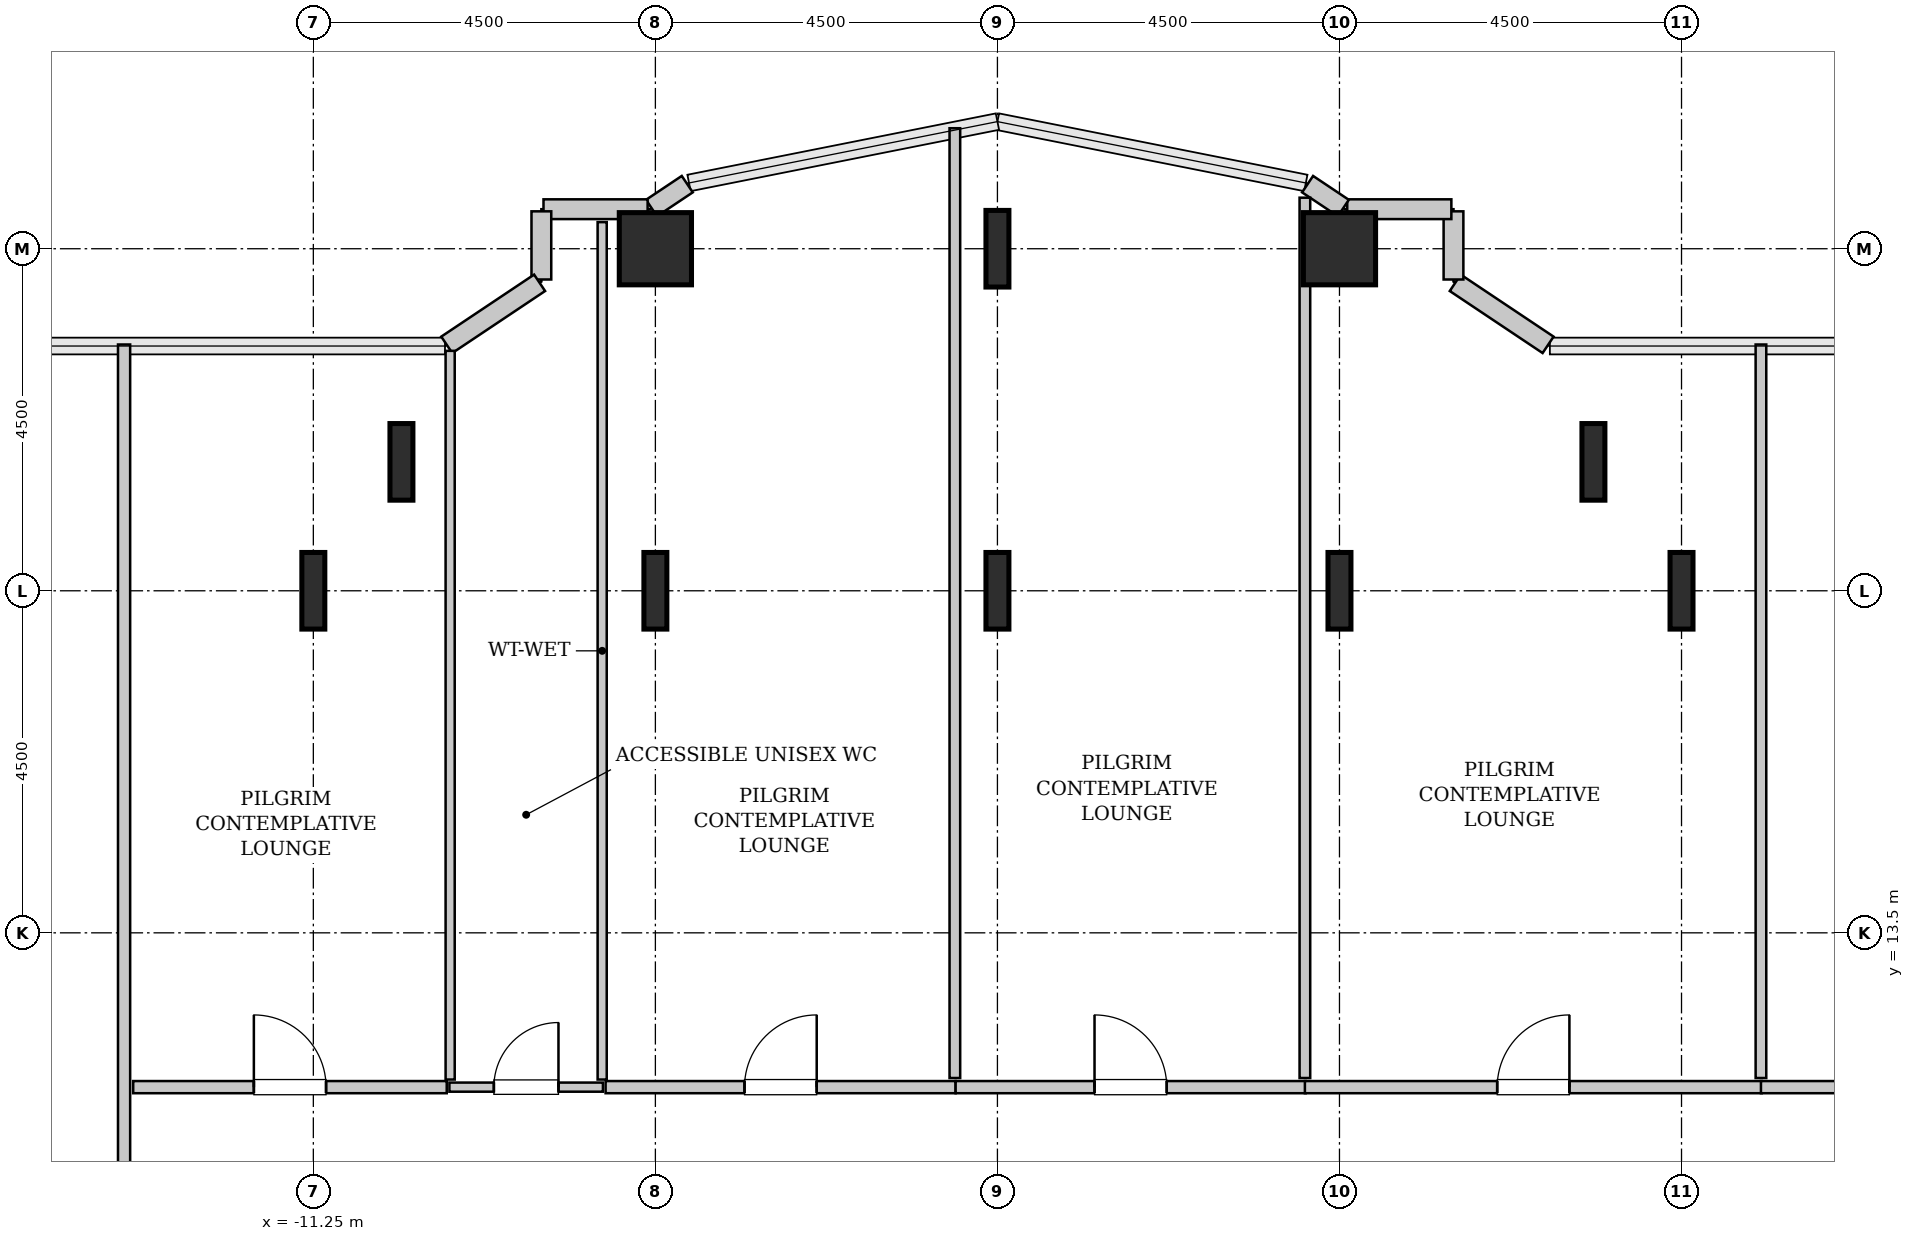
"""IFC4 building model, lengths in metres.
Left out: names, types, materials, properties, quantities, classifications, styles, units other than length and angle.
Written with IfcOpenShell. Run it as: python <this file> out.ifc"""

import sys

from ifc_helpers import new_model, si_unit, direction, frame, frame_2d, origin, origin_2d, place, context, subcontext, project, spatial, rectangle, hollow_rectangle, i_section, extrude, source, transform, mapped, element, fill, save


model = new_model("IFC4")
c1 = context("Model", 3, precision=1e-05, world=origin(), true_north=direction((0.0, 1.0)))
c2 = subcontext(c1, "Body", "Model", "MODEL_VIEW")
j1 = project(units=[si_unit("LENGTHUNIT", "METRE"), si_unit("PLANEANGLEUNIT", "RADIAN")], contexts=[c1])
p1 = place(None, origin())
s1 = spatial("IfcSite", under=j1, at=p1, CompositionType="ELEMENT")
p2 = place(p1, origin())
s2 = spatial("IfcBuilding", under=s1, at=p2, CompositionType="ELEMENT")
p3 = place(p2, frame((0.0, 0.0, 59.6)))
s3 = spatial("IfcBuildingStorey", under=s2, at=p3, CompositionType="ELEMENT", Elevation=59.6)
m1 = source(origin(), c2, "Body", "SweptSolid", [
    extrude(i_section(OverallWidth=0.302, OverallDepth=1.008, WebThickness=0.021, FlangeThickness=0.04, FilletRadius=0.03, at=origin_2d()), origin(), (0.0, 0.0, 1.0), 3.8),
])
for number, where, z_axis, x_axis in (
    (1, (-11.25, 18.0, 0.0), (0.0, 0.0, 1.0), (1.0, 0.0, 0.0)),
    (2, (-10.091, 19.696, 0.0), (0.0, 0.0, 1.0), (1.0, 0.0, 0.0)),
    (3, (-6.75, 18.0, 0.0), (0.0, 0.0, 1.0), (1.0, 0.0, 0.0)),
):
    element("IfcColumn", number, at=place(p3, frame(where, z_axis=z_axis, x_axis=x_axis)), inside=s3, PredefinedType="COLUMN", context=c2, shape_type="MappedRepresentation", body=[
        mapped(m1, transform((0.0, 0.0, 0.0), x_axis=(1.0, 0.0, 0.0), y_axis=(0.0, 1.0, 0.0), z_axis=(0.0, 0.0, 1.0), scale=1.0)),
    ])
m2 = source(origin(), c2, "Body", "SweptSolid", [
    extrude(hollow_rectangle(XDim=0.95, YDim=0.95, WallThickness=0.045, InnerFilletRadius=0.045, OuterFilletRadius=0.09, at=origin_2d()), origin(), (0.0, 0.0, 1.0), 3.8),
])
p4 = place(p3, frame((-6.75, 22.5, 0.0), z_axis=(0.0, 0.0, 1.0), x_axis=(1.0, 0.0, 0.0)))
e4 = element("IfcColumn", 4, at=p4, inside=s3, PredefinedType="COLUMN", context=c2, shape_type="MappedRepresentation", body=[
    mapped(m2, transform((0.0, 0.0, 0.0), x_axis=(1.0, 0.0, 0.0), y_axis=(0.0, 1.0, 0.0), z_axis=(0.0, 0.0, 1.0), scale=1.0)),
])
for number, where, z_axis, x_axis in (
    (5, (-2.25, 18.0, 0.0), (0.0, 0.0, 1.0), (1.0, 0.0, 0.0)),
    (6, (-2.25, 22.5, 0.0), (0.0, 0.0, 1.0), (1.0, 0.0, 0.0)),
    (7, (2.25, 18.0, 0.0), (0.0, 0.0, 1.0), (1.0, 0.0, 0.0)),
):
    element("IfcColumn", number, at=place(p3, frame(where, z_axis=z_axis, x_axis=x_axis)), inside=s3, PredefinedType="COLUMN", context=c2, shape_type="MappedRepresentation", body=[
        mapped(m1, transform((0.0, 0.0, 0.0), x_axis=(1.0, 0.0, 0.0), y_axis=(0.0, 1.0, 0.0), z_axis=(0.0, 0.0, 1.0), scale=1.0)),
    ])
p5 = place(p3, frame((2.25, 22.5, 0.0), z_axis=(0.0, 0.0, 1.0), x_axis=(1.0, 0.0, 0.0)))
e8 = element("IfcColumn", 8, at=p5, inside=s3, PredefinedType="COLUMN", context=c2, shape_type="MappedRepresentation", body=[
    mapped(m2, transform((0.0, 0.0, 0.0), x_axis=(1.0, 0.0, 0.0), y_axis=(0.0, 1.0, 0.0), z_axis=(0.0, 0.0, 1.0), scale=1.0)),
])
for number, where, z_axis, x_axis in (
    (9, (5.591, 19.696, 0.0), (0.0, 0.0, 1.0), (1.0, 0.0, 0.0)),
    (10, (6.75, 18.0, 0.0), (0.0, 0.0, 1.0), (1.0, 0.0, 0.0)),
):
    element("IfcColumn", number, at=place(p3, frame(where, z_axis=z_axis, x_axis=x_axis)), inside=s3, PredefinedType="COLUMN", context=c2, shape_type="MappedRepresentation", body=[
        mapped(m1, transform((0.0, 0.0, 0.0), x_axis=(1.0, 0.0, 0.0), y_axis=(0.0, 1.0, 0.0), z_axis=(0.0, 0.0, 1.0), scale=1.0)),
    ])
m3 = source(origin(), c2, "Body", "SweptSolid", [
    extrude(rectangle(XDim=1.469, YDim=0.26, at=frame_2d((0.734, 0.0))), origin(), (0.0, 0.0, 1.0), 3.55),
])
p6 = place(p3, frame((4.995, 21.236, 0.0), z_axis=(0.0, 0.0, 1.0), x_axis=(-0.831461760506, 0.555581983884, 0.0)))
e11 = element("IfcWall", 11, at=p6, inside=s3, PredefinedType="SOLIDWALL", context=c2, shape_type="MappedRepresentation", body=[
    mapped(m3, transform((0.0, 0.0, 0.0), x_axis=(1.0, 0.0, 0.0), y_axis=(0.0, 1.0, 0.0), z_axis=(0.0, 0.0, 1.0), scale=1.0)),
])
m4 = source(origin(), c2, "Body", "SweptSolid", [
    extrude(rectangle(XDim=0.897, YDim=0.26, at=frame_2d((0.448, 0.0))), origin(), (0.0, 0.0, 1.0), 3.55),
])
p7 = place(p3, frame((3.75, 22.095, 0.0), z_axis=(0.0, 0.0, 1.0), x_axis=(0.0, 1.0, 0.0)))
e12 = element("IfcWall", 12, at=p7, inside=s3, PredefinedType="SOLIDWALL", context=c2, shape_type="MappedRepresentation", body=[
    mapped(m4, transform((0.0, 0.0, 0.0), x_axis=(1.0, 0.0, 0.0), y_axis=(0.0, 1.0, 0.0), z_axis=(0.0, 0.0, 1.0), scale=1.0)),
])
m5 = source(origin(), c2, "Body", "SweptSolid", [
    extrude(rectangle(XDim=1.37, YDim=0.26, at=frame_2d((0.685, 0.0))), origin(), (0.0, 0.0, 1.0), 3.55),
])
p8 = place(p3, frame((3.722, 23.02, 0.0), z_axis=(0.0, 0.0, 1.0), x_axis=(-1.0, 0.0, 0.0)))
e13 = element("IfcWall", 13, at=p8, inside=s3, PredefinedType="SOLIDWALL", context=c2, shape_type="MappedRepresentation", body=[
    mapped(m5, transform((0.0, 0.0, 0.0), x_axis=(1.0, 0.0, 0.0), y_axis=(0.0, 1.0, 0.0), z_axis=(0.0, 0.0, 1.0), scale=1.0)),
])
m6 = source(origin(), c2, "Body", "SweptSolid", [
    extrude(rectangle(XDim=0.565, YDim=0.26, at=frame_2d((0.283, 0.0))), origin(), (0.0, 0.0, 1.0), 3.55),
])
for number, where, z_axis, x_axis in (
    (14, (2.301, 23.036, 0.0), (0.0, 0.0, 1.0), (-0.832, 0.555, 0.0)),
    (15, (-6.331, 23.35, 0.0), (0.0, 0.0, 1.0), (-0.832, -0.555, 0.0)),
):
    element("IfcWall", number, at=place(p3, frame(where, z_axis=z_axis, x_axis=x_axis)), inside=s3, PredefinedType="SOLIDWALL", context=c2, shape_type="MappedRepresentation", body=[
        mapped(m6, transform((0.0, 0.0, 0.0), x_axis=(1.0, 0.0, 0.0), y_axis=(0.0, 1.0, 0.0), z_axis=(0.0, 0.0, 1.0), scale=1.0)),
    ])
p9 = place(p3, frame((-6.852, 23.02, 0.0), z_axis=(0.0, 0.0, 1.0), x_axis=(-1.0, 0.0, 0.0)))
e16 = element("IfcWall", 16, at=p9, inside=s3, PredefinedType="SOLIDWALL", context=c2, shape_type="MappedRepresentation", body=[
    mapped(m5, transform((0.0, 0.0, 0.0), x_axis=(1.0, 0.0, 0.0), y_axis=(0.0, 1.0, 0.0), z_axis=(0.0, 0.0, 1.0), scale=1.0)),
])
p10 = place(p3, frame((-8.25, 22.992, 0.0), z_axis=(0.0, 0.0, 1.0), x_axis=(0.0, -1.0, 0.0)))
e17 = element("IfcWall", 17, at=p10, inside=s3, PredefinedType="SOLIDWALL", context=c2, shape_type="MappedRepresentation", body=[
    mapped(m4, transform((0.0, 0.0, 0.0), x_axis=(1.0, 0.0, 0.0), y_axis=(0.0, 1.0, 0.0), z_axis=(0.0, 0.0, 1.0), scale=1.0)),
])
p11 = place(p3, frame((-8.273, 22.052, 0.0), z_axis=(0.0, 0.0, 1.0), x_axis=(-0.831461760506, -0.555581983884, 0.0)))
e18 = element("IfcWall", 18, at=p11, inside=s3, PredefinedType="SOLIDWALL", context=c2, shape_type="MappedRepresentation", body=[
    mapped(m3, transform((0.0, 0.0, 0.0), x_axis=(1.0, 0.0, 0.0), y_axis=(0.0, 1.0, 0.0), z_axis=(0.0, 0.0, 1.0), scale=1.0)),
])
m7 = source(origin(), c2, "Body", "SweptSolid", [
    extrude(rectangle(XDim=2.02, YDim=0.12, at=frame_2d((1.01, 0.0))), origin(), (0.0, 0.0, 1.0), 3.535),
])
p12 = place(p3, frame((-9.46, 11.47, 0.0), z_axis=(0.0, 0.0, 1.0), x_axis=(1.0, 0.0, 0.0)))
e19 = element("IfcWall", 19, at=p12, inside=s3, PredefinedType="PLUMBINGWALL", context=c2, shape_type="MappedRepresentation", body=[
    mapped(m7, transform((0.0, 0.0, 0.0), x_axis=(1.0, 0.0, 0.0), y_axis=(0.0, 1.0, 0.0), z_axis=(0.0, 0.0, 1.0), scale=1.0)),
])
p13 = place(p12, frame((0.585, 0.0, 0.0)))
e20 = element("IfcOpeningElement", 20, at=p13, cuts=e19, PredefinedType="OPENING", context=c2, shape_type="SweptSolid", body=[
    extrude(rectangle(XDim=0.85, YDim=2.1, at=frame_2d((0.425, 1.05))), frame((0.0, 0.07, 0.0), z_axis=(0.0, -1.0, 0.0), x_axis=(1.0, 0.0, 0.0)), (0.0, 0.0, 1.0), 0.14),
])
m8 = source(origin(), c2, "Body", "SweptSolid", [
    extrude(rectangle(XDim=11.28, YDim=0.12, at=frame_2d((5.64, 0.0))), origin(), (0.0, 0.0, 1.0), 3.535),
])
p14 = place(p3, frame((-7.45, 11.57, 0.0), z_axis=(0.0, 0.0, 1.0), x_axis=(0.0, 1.0, 0.0)))
e21 = element("IfcWall", 21, at=p14, inside=s3, PredefinedType="PLUMBINGWALL", context=c2, shape_type="MappedRepresentation", body=[
    mapped(m8, transform((0.0, 0.0, 0.0), x_axis=(1.0, 0.0, 0.0), y_axis=(0.0, 1.0, 0.0), z_axis=(0.0, 0.0, 1.0), scale=1.0)),
])
m9 = source(origin(), c2, "Body", "SweptSolid", [
    extrude(rectangle(XDim=9.587, YDim=0.12, at=frame_2d((4.793, 0.0))), origin(), (0.0, 0.0, 1.0), 3.535),
])
p15 = place(p3, frame((-9.45, 11.57, 0.0), z_axis=(0.0, 0.0, 1.0), x_axis=(0.0, 1.0, 0.0)))
e22 = element("IfcWall", 22, at=p15, inside=s3, PredefinedType="PLUMBINGWALL", context=c2, shape_type="MappedRepresentation", body=[
    mapped(m9, transform((0.0, 0.0, 0.0), x_axis=(1.0, 0.0, 0.0), y_axis=(0.0, 1.0, 0.0), z_axis=(0.0, 0.0, 1.0), scale=1.0)),
])
m10 = source(origin(), c2, "Body", "SweptSolid", [
    extrude(rectangle(XDim=12.752, YDim=0.16, at=frame_2d((6.376, 0.0))), origin(), (0.0, 0.0, 1.0), 3.535),
])
p16 = place(p3, frame((-13.74, 8.488, 0.0), z_axis=(0.0, 0.0, 1.0), x_axis=(0.0, 1.0, 0.0)))
e23 = element("IfcWall", 23, at=p16, inside=s3, PredefinedType="PARTITIONING", context=c2, shape_type="MappedRepresentation", body=[
    mapped(m10, transform((0.0, 0.0, 0.0), x_axis=(1.0, 0.0, 0.0), y_axis=(0.0, 1.0, 0.0), z_axis=(0.0, 0.0, 1.0), scale=1.0)),
])
p17 = place(p16, frame((1.036, 0.0, 0.0)))
e24 = element("IfcOpeningElement", 24, at=p17, cuts=e23, PredefinedType="OPENING", context=c2, shape_type="SweptSolid", body=[
    extrude(rectangle(XDim=0.95, YDim=2.1, at=frame_2d((0.475, 1.05))), frame((0.0, 0.09, 0.0), z_axis=(0.0, -1.0, 0.0), x_axis=(1.0, 0.0, 0.0)), (0.0, 0.0, 1.0), 0.18),
])
m11 = source(origin(), c2, "Body", "SweptSolid", [
    extrude(rectangle(XDim=4.125, YDim=0.16, at=frame_2d((2.062, 0.0))), origin(), (0.0, 0.0, 1.0), 3.535),
])
p18 = place(p3, frame((-13.62, 11.47, 0.0), z_axis=(0.0, 0.0, 1.0), x_axis=(1.0, 0.0, 0.0)))
e25 = element("IfcWall", 25, at=p18, inside=s3, PredefinedType="PARTITIONING", context=c2, shape_type="MappedRepresentation", body=[
    mapped(m11, transform((0.0, 0.0, 0.0), x_axis=(1.0, 0.0, 0.0), y_axis=(0.0, 1.0, 0.0), z_axis=(0.0, 0.0, 1.0), scale=1.0)),
])
p19 = place(p18, frame((1.587, 0.0, 0.0)))
e26 = element("IfcOpeningElement", 26, at=p19, cuts=e25, PredefinedType="OPENING", context=c2, shape_type="SweptSolid", body=[
    extrude(rectangle(XDim=0.95, YDim=2.1, at=frame_2d((0.475, 1.05))), frame((0.0, 0.09, 0.0), z_axis=(0.0, -1.0, 0.0), x_axis=(1.0, 0.0, 0.0)), (0.0, 0.0, 1.0), 0.18),
])
m12 = source(origin(), c2, "Body", "SweptSolid", [
    extrude(rectangle(XDim=4.605, YDim=0.16, at=frame_2d((2.302, 0.0))), origin(), (0.0, 0.0, 1.0), 3.535),
])
p20 = place(p3, frame((-7.405, 11.47, 0.0), z_axis=(0.0, 0.0, 1.0), x_axis=(1.0, 0.0, 0.0)))
e27 = element("IfcWall", 27, at=p20, inside=s3, PredefinedType="PARTITIONING", context=c2, shape_type="MappedRepresentation", body=[
    mapped(m12, transform((0.0, 0.0, 0.0), x_axis=(1.0, 0.0, 0.0), y_axis=(0.0, 1.0, 0.0), z_axis=(0.0, 0.0, 1.0), scale=1.0)),
])
p21 = place(p20, frame((1.827, 0.0, 0.0)))
e28 = element("IfcOpeningElement", 28, at=p21, cuts=e27, PredefinedType="OPENING", context=c2, shape_type="SweptSolid", body=[
    extrude(rectangle(XDim=0.95, YDim=2.1, at=frame_2d((0.475, 1.05))), frame((0.0, 0.09, 0.0), z_axis=(0.0, -1.0, 0.0), x_axis=(1.0, 0.0, 0.0)), (0.0, 0.0, 1.0), 0.18),
])
m13 = source(origin(), c2, "Body", "SweptSolid", [
    extrude(rectangle(XDim=12.495, YDim=0.14, at=frame_2d((6.248, 0.0))), origin(), (0.0, 0.0, 1.0), 3.535),
])
p22 = place(p3, frame((-2.81, 11.59, 0.0), z_axis=(0.0, 0.0, 1.0), x_axis=(0.0, 1.0, 0.0)))
e29 = element("IfcWall", 29, at=p22, inside=s3, PredefinedType="PARTITIONING", context=c2, shape_type="MappedRepresentation", body=[
    mapped(m13, transform((0.0, 0.0, 0.0), x_axis=(1.0, 0.0, 0.0), y_axis=(0.0, 1.0, 0.0), z_axis=(0.0, 0.0, 1.0), scale=1.0)),
])
p23 = place(p3, frame((-2.8, 11.47, 0.0), z_axis=(0.0, 0.0, 1.0), x_axis=(1.0, 0.0, 0.0)))
e30 = element("IfcWall", 30, at=p23, inside=s3, PredefinedType="PARTITIONING", context=c2, shape_type="MappedRepresentation", body=[
    mapped(m12, transform((0.0, 0.0, 0.0), x_axis=(1.0, 0.0, 0.0), y_axis=(0.0, 1.0, 0.0), z_axis=(0.0, 0.0, 1.0), scale=1.0)),
])
p24 = place(p23, frame((1.827, 0.0, 0.0)))
e31 = element("IfcOpeningElement", 31, at=p24, cuts=e30, PredefinedType="OPENING", context=c2, shape_type="SweptSolid", body=[
    extrude(rectangle(XDim=0.95, YDim=2.1, at=frame_2d((0.475, 1.05))), frame((0.0, 0.09, 0.0), z_axis=(0.0, -1.0, 0.0), x_axis=(1.0, 0.0, 0.0)), (0.0, 0.0, 1.0), 0.18),
])
m14 = source(origin(), c2, "Body", "SweptSolid", [
    extrude(rectangle(XDim=11.581, YDim=0.14, at=frame_2d((5.791, 0.0))), origin(), (0.0, 0.0, 1.0), 2.825),
])
p25 = place(p3, frame((1.795, 11.59, 0.0), z_axis=(0.0, 0.0, 1.0), x_axis=(0.0, 1.0, 0.0)))
e32 = element("IfcWall", 32, at=p25, inside=s3, PredefinedType="PARTITIONING", context=c2, shape_type="MappedRepresentation", body=[
    mapped(m14, transform((0.0, 0.0, 0.0), x_axis=(1.0, 0.0, 0.0), y_axis=(0.0, 1.0, 0.0), z_axis=(0.0, 0.0, 1.0), scale=1.0)),
])
m15 = source(origin(), c2, "Body", "SweptSolid", [
    extrude(rectangle(XDim=6.01, YDim=0.16, at=frame_2d((3.005, 0.0))), origin(), (0.0, 0.0, 1.0), 3.535),
])
p26 = place(p3, frame((1.795, 11.47, 0.0), z_axis=(0.0, 0.0, 1.0), x_axis=(1.0, 0.0, 0.0)))
e33 = element("IfcWall", 33, at=p26, inside=s3, PredefinedType="PARTITIONING", context=c2, shape_type="MappedRepresentation", body=[
    mapped(m15, transform((0.0, 0.0, 0.0), x_axis=(1.0, 0.0, 0.0), y_axis=(0.0, 1.0, 0.0), z_axis=(0.0, 0.0, 1.0), scale=1.0)),
])
p27 = place(p26, frame((2.53, 0.0, 0.0)))
e34 = element("IfcOpeningElement", 34, at=p27, cuts=e33, PredefinedType="OPENING", context=c2, shape_type="SweptSolid", body=[
    extrude(rectangle(XDim=0.95, YDim=2.1, at=frame_2d((0.475, 1.05))), frame((0.0, 0.09, 0.0), z_axis=(0.0, -1.0, 0.0), x_axis=(1.0, 0.0, 0.0)), (0.0, 0.0, 1.0), 0.18),
])
m16 = source(origin(), c2, "Body", "SweptSolid", [
    extrude(rectangle(XDim=9.65, YDim=0.14, at=frame_2d((4.825, 0.0))), origin(), (0.0, 0.0, 1.0), 3.535),
])
p28 = place(p3, frame((7.795, 11.59, 0.0), z_axis=(0.0, 0.0, 1.0), x_axis=(0.0, 1.0, 0.0)))
e35 = element("IfcWall", 35, at=p28, inside=s3, PredefinedType="PARTITIONING", context=c2, shape_type="MappedRepresentation", body=[
    mapped(m16, transform((0.0, 0.0, 0.0), x_axis=(1.0, 0.0, 0.0), y_axis=(0.0, 1.0, 0.0), z_axis=(0.0, 0.0, 1.0), scale=1.0)),
])
m17 = source(origin(), c2, "Body", "SweptSolid", [
    extrude(rectangle(XDim=5.825, YDim=0.16, at=frame_2d((2.913, 0.0))), origin(), (0.0, 0.0, 1.0), 3.535),
])
p29 = place(p3, frame((7.795, 11.47, 0.0), z_axis=(0.0, 0.0, 1.0), x_axis=(1.0, 0.0, 0.0)))
e36 = element("IfcWall", 36, at=p29, inside=s3, PredefinedType="PARTITIONING", context=c2, shape_type="MappedRepresentation", body=[
    mapped(m17, transform((0.0, 0.0, 0.0), x_axis=(1.0, 0.0, 0.0), y_axis=(0.0, 1.0, 0.0), z_axis=(0.0, 0.0, 1.0), scale=1.0)),
])
p30 = place(p29, frame((2.438, 0.0, 0.0)))
e37 = element("IfcOpeningElement", 37, at=p30, cuts=e36, PredefinedType="OPENING", context=c2, shape_type="SweptSolid", body=[
    extrude(rectangle(XDim=0.95, YDim=2.1, at=frame_2d((0.475, 1.05))), frame((0.0, 0.09, 0.0), z_axis=(0.0, -1.0, 0.0), x_axis=(1.0, 0.0, 0.0)), (0.0, 0.0, 1.0), 0.18),
])
m18 = source(origin(), c2, "Body", "SweptSolid", [
    extrude(rectangle(XDim=0.85, YDim=2.1, at=frame_2d((0.425, 1.05))), frame((0.0, 0.025, 0.0), z_axis=(0.0, -1.0, 0.0), x_axis=(1.0, 0.0, 0.0)), (0.0, 0.0, 1.0), 0.05),
])
p31 = place(p13, origin())
e38 = element("IfcDoor", 38, at=p31, inside=s3, OperationType="SINGLE_SWING_RIGHT", PredefinedType="DOOR", context=c2, shape_type="MappedRepresentation", body=[
    mapped(m18, transform((0.0, 0.0, 0.0), x_axis=(1.0, 0.0, 0.0), y_axis=(0.0, 1.0, 0.0), z_axis=(0.0, 0.0, 1.0), scale=1.0)),
])
fill(e20, e38)
m19 = source(origin(), c2, "Body", "SweptSolid", [
    extrude(rectangle(XDim=0.95, YDim=2.1, at=frame_2d((0.475, 1.05))), frame((0.0, 0.025, 0.0), z_axis=(0.0, -1.0, 0.0), x_axis=(1.0, 0.0, 0.0)), (0.0, 0.0, 1.0), 0.05),
])
p32 = place(p19, origin())
e39 = element("IfcDoor", 39, at=p32, inside=s3, OperationType="SINGLE_SWING_LEFT", PredefinedType="DOOR", context=c2, shape_type="MappedRepresentation", body=[
    mapped(m19, transform((0.0, 0.0, 0.0), x_axis=(1.0, 0.0, 0.0), y_axis=(0.0, 1.0, 0.0), z_axis=(0.0, 0.0, 1.0), scale=1.0)),
])
fill(e26, e39)
p33 = place(p21, origin())
e40 = element("IfcDoor", 40, at=p33, inside=s3, OperationType="SINGLE_SWING_RIGHT", PredefinedType="DOOR", context=c2, shape_type="MappedRepresentation", body=[
    mapped(m19, transform((0.0, 0.0, 0.0), x_axis=(1.0, 0.0, 0.0), y_axis=(0.0, 1.0, 0.0), z_axis=(0.0, 0.0, 1.0), scale=1.0)),
])
fill(e28, e40)
p34 = place(p24, origin())
e41 = element("IfcDoor", 41, at=p34, inside=s3, OperationType="SINGLE_SWING_LEFT", PredefinedType="DOOR", context=c2, shape_type="MappedRepresentation", body=[
    mapped(m19, transform((0.0, 0.0, 0.0), x_axis=(1.0, 0.0, 0.0), y_axis=(0.0, 1.0, 0.0), z_axis=(0.0, 0.0, 1.0), scale=1.0)),
])
fill(e31, e41)
p35 = place(p27, origin())
e42 = element("IfcDoor", 42, at=p35, inside=s3, OperationType="SINGLE_SWING_RIGHT", PredefinedType="DOOR", context=c2, shape_type="MappedRepresentation", body=[
    mapped(m19, transform((0.0, 0.0, 0.0), x_axis=(1.0, 0.0, 0.0), y_axis=(0.0, 1.0, 0.0), z_axis=(0.0, 0.0, 1.0), scale=1.0)),
])
fill(e34, e42)
save(model, sys.argv[1])
